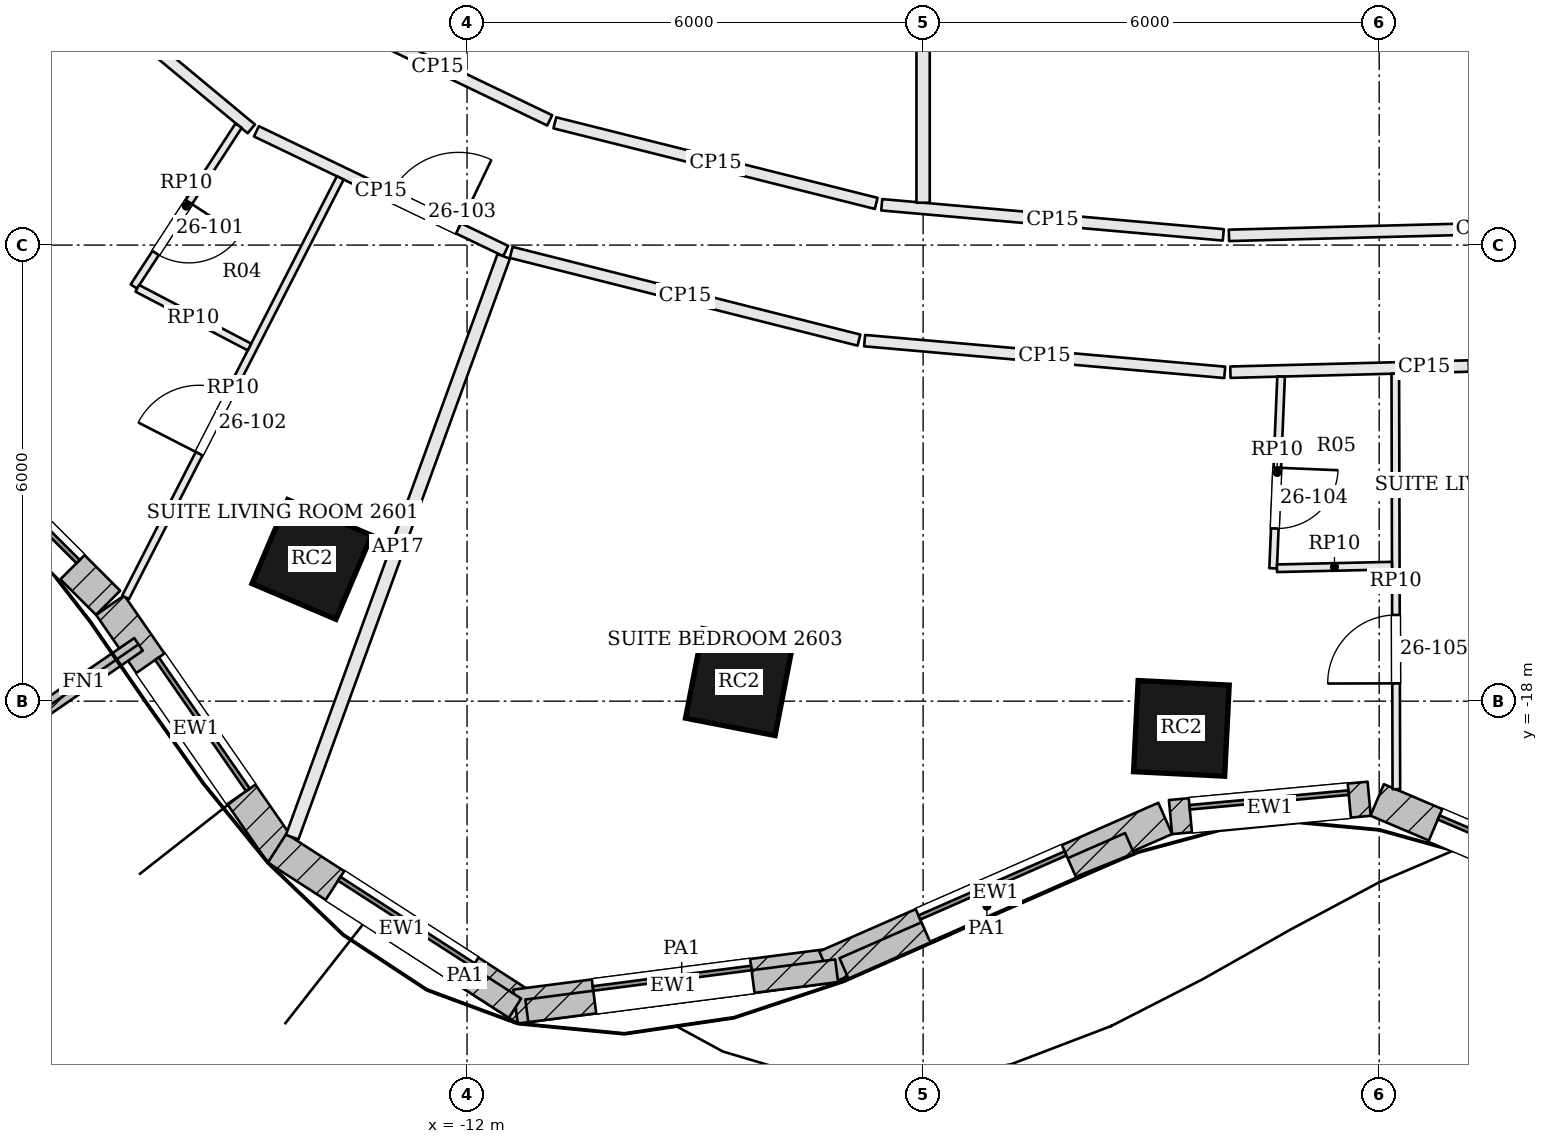
"""IFC4 building model, lengths in metres.
Left out: names, types, materials, properties, quantities, classifications, styles, units other than length and angle.
Written with IfcOpenShell. Run it as: python <this file> out.ifc"""

import sys

from ifc_helpers import new_model, si_unit, direction, frame, frame_2d, origin, origin_2d, place, context, subcontext, project, spatial, rectangle, extrude, element, fill, save


model = new_model("IFC4")
c1 = context("Model", 3, precision=1e-05, world=origin(), true_north=direction((0.0, 1.0)))
c2 = subcontext(c1, "Body", "Model", "MODEL_VIEW")
j1 = project(units=[si_unit("LENGTHUNIT", "METRE"), si_unit("PLANEANGLEUNIT", "RADIAN")], contexts=[c1])
p1 = place(None, origin())
s1 = spatial("IfcSite", under=j1, at=p1, CompositionType="ELEMENT")
p2 = place(p1, origin())
s2 = spatial("IfcBuilding", under=s1, at=p2, CompositionType="ELEMENT")
p3 = place(p2, frame((0.0, 0.0, 110.4)))
s3 = spatial("IfcBuildingStorey", under=s2, at=p3, CompositionType="ELEMENT", Elevation=110.4)
for number, where, z_axis, x_axis in (
    (1, (-14.042, -16.136, 0.0), (0.0, 0.0, 1.0), (0.92, -0.392, 0.0)),
    (2, (-8.422, -17.749, 0.0), (0.0, 0.0, 1.0), (0.982, -0.191, 0.0)),
    (3, (-2.602, -18.358, 0.0), (0.0, 0.0, 1.0), (0.999, -0.05, 0.0)),
):
    element("IfcColumn", number, at=place(p3, frame(where, z_axis=z_axis, x_axis=x_axis)), inside=s3, PredefinedType="COLUMN", context=c2, shape_type="SweptSolid", body=[
        extrude(rectangle(XDim=1.2, YDim=1.2, at=origin_2d()), origin(), (0.0, 0.0, 1.0), 3.6),
    ])
p4 = place(p3, frame((-19.145, -14.285, 0.0), z_axis=(0.0, 0.0, 1.0), x_axis=(0.707427521052, -0.706785895769, 0.0)))
e4 = element("IfcWall", 4, at=p4, inside=s3, PredefinedType="SOLIDWALL", context=c2, shape_type="SweptSolid", body=[
    extrude(rectangle(XDim=3.425, YDim=0.45, at=frame_2d((1.712, 0.0))), origin(), (0.0, 0.0, 1.0), 3.4),
])
p5 = place(p4, frame((0.662, 0.0, 0.9)))
e5 = element("IfcOpeningElement", 5, at=p5, cuts=e4, PredefinedType="OPENING", context=c2, shape_type="SweptSolid", body=[
    extrude(rectangle(XDim=2.1, YDim=2.0, at=frame_2d((1.05, 1.0))), frame((0.0, 0.235, 0.0), z_axis=(0.0, -1.0, 0.0), x_axis=(1.0, 0.0, 0.0)), (0.0, 0.0, 1.0), 0.47),
])
p6 = place(p3, frame((-16.695, -16.737, 0.0), z_axis=(0.0, 0.0, 1.0), x_axis=(0.569652445465, -0.821885692402, 0.0)))
e6 = element("IfcWall", 6, at=p6, inside=s3, PredefinedType="SOLIDWALL", context=c2, shape_type="SweptSolid", body=[
    extrude(rectangle(XDim=3.959, YDim=0.45, at=frame_2d((1.979, 0.0))), origin(), (0.0, 0.0, 1.0), 3.4),
])
p7 = place(p6, frame((0.929, 0.0, 0.9)))
e7 = element("IfcOpeningElement", 7, at=p7, cuts=e6, PredefinedType="OPENING", context=c2, shape_type="SweptSolid", body=[
    extrude(rectangle(XDim=2.1, YDim=2.0, at=frame_2d((1.05, 1.0))), frame((0.0, 0.235, 0.0), z_axis=(0.0, -1.0, 0.0), x_axis=(1.0, 0.0, 0.0)), (0.0, 0.0, 1.0), 0.47),
])
p8 = place(p3, frame((-14.499, -19.935, 0.0), z_axis=(0.0, 0.0, 1.0), x_axis=(0.84080910763, -0.541331732422, 0.0)))
e8 = element("IfcWall", 8, at=p8, inside=s3, PredefinedType="SOLIDWALL", context=c2, shape_type="SweptSolid", body=[
    extrude(rectangle(XDim=3.911, YDim=0.45, at=frame_2d((1.955, 0.0))), origin(), (0.0, 0.0, 1.0), 3.4),
])
p9 = place(p8, frame((0.905, 0.0, 0.9)))
e9 = element("IfcOpeningElement", 9, at=p9, cuts=e8, PredefinedType="OPENING", context=c2, shape_type="SweptSolid", body=[
    extrude(rectangle(XDim=2.1, YDim=2.0, at=frame_2d((1.05, 1.0))), frame((0.0, 0.235, 0.0), z_axis=(0.0, -1.0, 0.0), x_axis=(1.0, 0.0, 0.0)), (0.0, 0.0, 1.0), 0.47),
])
p10 = place(p3, frame((-11.362, -22.018, 0.0), z_axis=(0.0, 0.0, 1.0), x_axis=(0.991724958022, 0.128380713645, 0.0)))
e10 = element("IfcWall", 10, at=p10, inside=s3, PredefinedType="SOLIDWALL", context=c2, shape_type="SweptSolid", body=[
    extrude(rectangle(XDim=4.182, YDim=0.45, at=frame_2d((2.091, 0.0))), origin(), (0.0, 0.0, 1.0), 3.4),
])
p11 = place(p10, frame((1.041, 0.0, 0.9)))
e11 = element("IfcOpeningElement", 11, at=p11, cuts=e10, PredefinedType="OPENING", context=c2, shape_type="SweptSolid", body=[
    extrude(rectangle(XDim=2.1, YDim=2.0, at=frame_2d((1.05, 1.0))), frame((0.0, 0.235, 0.0), z_axis=(0.0, -1.0, 0.0), x_axis=(1.0, 0.0, 0.0)), (0.0, 0.0, 1.0), 0.47),
])
p12 = place(p3, frame((-7.276, -21.498, 0.0), z_axis=(0.0, 0.0, 1.0), x_axis=(0.915872941312, 0.401468249519, 0.0)))
e12 = element("IfcWall", 12, at=p12, inside=s3, PredefinedType="SOLIDWALL", context=c2, shape_type="SweptSolid", body=[
    extrude(rectangle(XDim=4.87, YDim=0.45, at=frame_2d((2.435, 0.0))), origin(), (0.0, 0.0, 1.0), 3.4),
])
p13 = place(p12, frame((1.385, 0.0, 0.9)))
e13 = element("IfcOpeningElement", 13, at=p13, cuts=e12, PredefinedType="OPENING", context=c2, shape_type="SweptSolid", body=[
    extrude(rectangle(XDim=2.1, YDim=2.0, at=frame_2d((1.05, 1.0))), frame((0.0, 0.235, 0.0), z_axis=(0.0, -1.0, 0.0), x_axis=(1.0, 0.0, 0.0)), (0.0, 0.0, 1.0), 0.47),
])
p14 = place(p3, frame((-2.745, -19.525, 0.0), z_axis=(0.0, 0.0, 1.0), x_axis=(0.995768774275, 0.091894222771, 0.0)))
e14 = element("IfcWall", 14, at=p14, inside=s3, PredefinedType="SOLIDWALL", context=c2, shape_type="SweptSolid", body=[
    extrude(rectangle(XDim=2.625, YDim=0.45, at=frame_2d((1.312, 0.0))), origin(), (0.0, 0.0, 1.0), 3.4),
])
p15 = place(p14, frame((0.262, 0.0, 0.9)))
e15 = element("IfcOpeningElement", 15, at=p15, cuts=e14, PredefinedType="OPENING", context=c2, shape_type="SweptSolid", body=[
    extrude(rectangle(XDim=2.1, YDim=2.0, at=frame_2d((1.05, 1.0))), frame((0.0, 0.235, 0.0), z_axis=(0.0, -1.0, 0.0), x_axis=(1.0, 0.0, 0.0)), (0.0, 0.0, 1.0), 0.47),
])
p16 = place(p3, frame((-0.026, -19.299, 0.0), z_axis=(0.0, 0.0, 1.0), x_axis=(0.920040408927, -0.391823488245, 0.0)))
e16 = element("IfcWall", 16, at=p16, inside=s3, PredefinedType="SOLIDWALL", context=c2, shape_type="SweptSolid", body=[
    extrude(rectangle(XDim=3.77, YDim=0.45, at=frame_2d((1.885, 0.0))), origin(), (0.0, 0.0, 1.0), 3.4),
])
p17 = place(p16, frame((0.835, 0.0, 0.9)))
e17 = element("IfcOpeningElement", 17, at=p17, cuts=e16, PredefinedType="OPENING", context=c2, shape_type="SweptSolid", body=[
    extrude(rectangle(XDim=2.1, YDim=2.0, at=frame_2d((1.05, 1.0))), frame((0.0, 0.235, 0.0), z_axis=(0.0, -1.0, 0.0), x_axis=(1.0, 0.0, 0.0)), (0.0, 0.0, 1.0), 0.47),
])
p18 = place(p3, frame((-16.322, -17.253, 0.0), z_axis=(0.0, 0.0, 1.0), x_axis=(-0.824440606412, -0.565948483962, 0.0)))
e18 = element("IfcWall", 18, at=p18, inside=s3, PredefinedType="SOLIDWALL", context=c2, shape_type="SweptSolid", body=[
    extrude(rectangle(XDim=1.75, YDim=0.2, at=frame_2d((0.875, 0.0))), origin(), (0.0, 0.0, 1.0), 3.4),
])
p19 = place(p3, frame((-12.68, -21.195, 3.6), z_axis=(0.0, 0.0, 1.0), x_axis=(0.840806975541, -0.541335044018, 0.0)))
e19 = element("IfcWall", 19, at=p19, inside=s3, PredefinedType="PARAPET", context=c2, shape_type="SweptSolid", body=[
    extrude(rectangle(XDim=1.56, YDim=0.3, at=frame_2d((0.78, 0.0))), origin(), (0.0, 0.0, 1.0), 1.1),
])
p20 = place(p3, frame((-11.214, -22.074, 3.6), z_axis=(0.0, 0.0, 1.0), x_axis=(0.991727449614, 0.128361464939, 0.0)))
e20 = element("IfcWall", 20, at=p20, inside=s3, PredefinedType="PARAPET", context=c2, shape_type="SweptSolid", body=[
    extrude(rectangle(XDim=4.11, YDim=0.3, at=frame_2d((2.055, 0.0))), origin(), (0.0, 0.0, 1.0), 1.1),
])
p21 = place(p3, frame((-7.039, -21.519, 3.6), z_axis=(0.0, 0.0, 1.0), x_axis=(0.915890739732, 0.401427643384, 0.0)))
e21 = element("IfcWall", 21, at=p21, inside=s3, PredefinedType="PARAPET", context=c2, shape_type="SweptSolid", body=[
    extrude(rectangle(XDim=4.102, YDim=0.3, at=frame_2d((2.051, 0.0))), origin(), (0.0, 0.0, 1.0), 1.1),
])
p22 = place(p3, frame((-17.446, -8.304, 0.0), z_axis=(0.0, 0.0, 1.0), x_axis=(0.769200174495, -0.639007896318, 0.0)))
e22 = element("IfcWall", 22, at=p22, inside=s3, PredefinedType="PARTITIONING", context=c2, shape_type="SweptSolid", body=[
    extrude(rectangle(XDim=3.39, YDim=0.15, at=frame_2d((1.695, 0.0))), origin(), (0.0, 0.0, 1.0), 2.784),
])
p23 = place(p3, frame((-14.771, -10.503, 0.0), z_axis=(0.0, 0.0, 1.0), x_axis=(0.901506299534, -0.432765978216, 0.0)))
e23 = element("IfcWall", 23, at=p23, inside=s3, PredefinedType="PARTITIONING", context=c2, shape_type="SweptSolid", body=[
    extrude(rectangle(XDim=3.638, YDim=0.15, at=frame_2d((1.819, 0.0))), origin(), (0.0, 0.0, 1.0), 2.784),
])
p24 = place(p23, frame((1.949, 0.0, 0.0)))
e24 = element("IfcOpeningElement", 24, at=p24, cuts=e23, PredefinedType="OPENING", context=c2, shape_type="SweptSolid", body=[
    extrude(rectangle(XDim=1.0, YDim=2.1, at=frame_2d((0.5, 1.05))), frame((0.0, 0.085, 0.0), z_axis=(0.0, -1.0, 0.0), x_axis=(1.0, 0.0, 0.0)), (0.0, 0.0, 1.0), 0.17),
])
p25 = place(p3, frame((-14.301, -19.789, 0.0), z_axis=(0.0, 0.0, 1.0), x_axis=(0.342254048829, 0.939607453174, 0.0)))
e25 = element("IfcWall", 25, at=p25, inside=s3, PredefinedType="PARTITIONING", context=c2, shape_type="SweptSolid", body=[
    extrude(rectangle(XDim=8.132, YDim=0.175, at=frame_2d((4.066, 0.0))), origin(), (0.0, 0.0, 1.0), 2.784),
])
p26 = place(p3, frame((-11.419, -12.096, 0.0), z_axis=(0.0, 0.0, 1.0), x_axis=(0.969625924548, -0.244592654109, 0.0)))
e26 = element("IfcWall", 26, at=p26, inside=s3, PredefinedType="PARTITIONING", context=c2, shape_type="SweptSolid", body=[
    extrude(rectangle(XDim=4.718, YDim=0.15, at=frame_2d((2.359, 0.0))), origin(), (0.0, 0.0, 1.0), 2.784),
])
p27 = place(p3, frame((-6.77, -13.257, 0.0), z_axis=(0.0, 0.0, 1.0), x_axis=(0.996139758015, -0.08778144737, 0.0)))
e27 = element("IfcWall", 27, at=p27, inside=s3, PredefinedType="PARTITIONING", context=c2, shape_type="SweptSolid", body=[
    extrude(rectangle(XDim=4.756, YDim=0.15, at=frame_2d((2.378, 0.0))), origin(), (0.0, 0.0, 1.0), 2.784),
])
p28 = place(p3, frame((-1.957, -13.672, 0.0), z_axis=(0.0, 0.0, 1.0), x_axis=(0.999663973177, 0.025921819609, 0.0)))
e28 = element("IfcWall", 28, at=p28, inside=s3, PredefinedType="PARTITIONING", context=c2, shape_type="SweptSolid", body=[
    extrude(rectangle(XDim=5.105, YDim=0.15, at=frame_2d((2.552, 0.0))), origin(), (0.0, 0.0, 1.0), 2.784),
])
p29 = place(p28, frame((3.137, 0.0, 0.0)))
e29 = element("IfcOpeningElement", 29, at=p29, cuts=e28, PredefinedType="OPENING", context=c2, shape_type="SweptSolid", body=[
    extrude(rectangle(XDim=1.0, YDim=2.1, at=frame_2d((0.5, 1.05))), frame((0.0, 0.085, 0.0), z_axis=(0.0, -1.0, 0.0), x_axis=(1.0, 0.0, 0.0)), (0.0, 0.0, 1.0), 0.17),
])
p30 = place(p3, frame((4.684, -11.699, 0.0), z_axis=(0.0, 0.0, 1.0), x_axis=(-0.999663438204, -0.025942442425, 0.0)))
e30 = element("IfcWall", 30, at=p30, inside=s3, PredefinedType="PARTITIONING", context=c2, shape_type="SweptSolid", body=[
    extrude(rectangle(XDim=6.663, YDim=0.15, at=frame_2d((3.332, 0.0))), origin(), (0.0, 0.0, 1.0), 2.784),
])
p31 = place(p3, frame((-2.051, -11.865, 0.0), z_axis=(0.0, 0.0, 1.0), x_axis=(-0.996139599493, 0.087783246245, 0.0)))
e31 = element("IfcWall", 31, at=p31, inside=s3, PredefinedType="PARTITIONING", context=c2, shape_type="SweptSolid", body=[
    extrude(rectangle(XDim=4.511, YDim=0.15, at=frame_2d((2.255, 0.0))), origin(), (0.0, 0.0, 1.0), 2.784),
])
p32 = place(p3, frame((-6.617, -11.451, 0.0), z_axis=(0.0, 0.0, 1.0), x_axis=(-0.969987441267, 0.243155020069, 0.0)))
e32 = element("IfcWall", 32, at=p32, inside=s3, PredefinedType="PARTITIONING", context=c2, shape_type="SweptSolid", body=[
    extrude(rectangle(XDim=4.359, YDim=0.15, at=frame_2d((2.179, 0.0))), origin(), (0.0, 0.0, 1.0), 2.784),
])
p33 = place(p3, frame((-10.913, -10.359, 0.0), z_axis=(0.0, 0.0, 1.0), x_axis=(-0.90149741277, 0.432784489982, 0.0)))
e33 = element("IfcWall", 33, at=p33, inside=s3, PredefinedType="PARTITIONING", context=c2, shape_type="SweptSolid", body=[
    extrude(rectangle(XDim=3.269, YDim=0.15, at=frame_2d((1.634, 0.0))), origin(), (0.0, 0.0, 1.0), 2.784),
])
p34 = place(p3, frame((-16.492, -16.635, 0.0), z_axis=(0.0, 0.0, 1.0), x_axis=(0.455543309506, 0.890213622208, 0.0)))
e34 = element("IfcWall", 34, at=p34, inside=s3, PredefinedType="PARTITIONING", context=c2, shape_type="SweptSolid", body=[
    extrude(rectangle(XDim=6.199, YDim=0.1, at=frame_2d((3.1, 0.0))), origin(), (0.0, 0.0, 1.0), 2.884),
])
p35 = place(p34, frame((2.124, 0.0, 0.0)))
e35 = element("IfcOpeningElement", 35, at=p35, cuts=e34, PredefinedType="OPENING", context=c2, shape_type="SweptSolid", body=[
    extrude(rectangle(XDim=0.9, YDim=2.4, at=frame_2d((0.45, 1.2))), frame((0.0, 0.06, 0.0), z_axis=(0.0, -1.0, 0.0), x_axis=(1.0, 0.0, 0.0)), (0.0, 0.0, 1.0), 0.12),
])
p36 = place(p3, frame((-15.006, -10.429, 0.0), z_axis=(0.0, 0.0, 1.0), x_axis=(-0.545698435258, -0.837981633306, 0.0)))
e36 = element("IfcWall", 36, at=p36, inside=s3, PredefinedType="PARTITIONING", context=c2, shape_type="SweptSolid", body=[
    extrude(rectangle(XDim=2.525, YDim=0.1, at=frame_2d((1.263, 0.0))), origin(), (0.0, 0.0, 1.0), 2.884),
])
p37 = place(p36, frame((1.2, 0.0, 0.0)))
e37 = element("IfcOpeningElement", 37, at=p37, cuts=e36, PredefinedType="OPENING", context=c2, shape_type="SweptSolid", body=[
    extrude(rectangle(XDim=0.8, YDim=2.1, at=frame_2d((0.4, 1.05))), frame((0.0, 0.06, 0.0), z_axis=(0.0, -1.0, 0.0), x_axis=(1.0, 0.0, 0.0)), (0.0, 0.0, 1.0), 0.12),
])
p38 = place(p3, frame((-16.339, -12.568, 0.0), z_axis=(0.0, 0.0, 1.0), x_axis=(0.885980612304, -0.463722281783, 0.0)))
e38 = element("IfcWall", 38, at=p38, inside=s3, PredefinedType="PARTITIONING", context=c2, shape_type="SweptSolid", body=[
    extrude(rectangle(XDim=1.666, YDim=0.1, at=frame_2d((0.833, 0.0))), origin(), (0.0, 0.0, 1.0), 2.884),
])
p39 = place(p3, frame((0.226, -19.158, 0.0), z_axis=(0.0, 0.0, 1.0), x_axis=(-0.002545543736, 0.999996760098, 0.0)))
e39 = element("IfcWall", 39, at=p39, inside=s3, PredefinedType="PARTITIONING", context=c2, shape_type="SweptSolid", body=[
    extrude(rectangle(XDim=5.467, YDim=0.1, at=frame_2d((2.733, 0.0))), origin(), (0.0, 0.0, 1.0), 2.884),
])
p40 = place(p39, frame((1.392, 0.0, 0.0)))
e40 = element("IfcOpeningElement", 40, at=p40, cuts=e39, PredefinedType="OPENING", context=c2, shape_type="SweptSolid", body=[
    extrude(rectangle(XDim=0.9, YDim=2.4, at=frame_2d((0.45, 1.2))), frame((0.0, 0.06, 0.0), z_axis=(0.0, -1.0, 0.0), x_axis=(1.0, 0.0, 0.0)), (0.0, 0.0, 1.0), 0.12),
])
p41 = place(p3, frame((-1.291, -13.73, 0.0), z_axis=(0.0, 0.0, 1.0), x_axis=(-0.041381206549, -0.999143431017, 0.0)))
e41 = element("IfcWall", 41, at=p41, inside=s3, PredefinedType="PARTITIONING", context=c2, shape_type="SweptSolid", body=[
    extrude(rectangle(XDim=2.525, YDim=0.1, at=frame_2d((1.263, 0.0))), origin(), (0.0, 0.0, 1.0), 2.884),
])
p42 = place(p41, frame((1.2, 0.0, 0.0)))
e42 = element("IfcOpeningElement", 42, at=p42, cuts=e41, PredefinedType="OPENING", context=c2, shape_type="SweptSolid", body=[
    extrude(rectangle(XDim=0.8, YDim=2.1, at=frame_2d((0.4, 1.05))), frame((0.0, 0.06, 0.0), z_axis=(0.0, -1.0, 0.0), x_axis=(1.0, 0.0, 0.0)), (0.0, 0.0, 1.0), 0.12),
])
p43 = place(p3, frame((-1.345, -16.251, 0.0), z_axis=(0.0, 0.0, 1.0), x_axis=(0.999741502451, 0.022736056749, 0.0)))
e43 = element("IfcWall", 43, at=p43, inside=s3, PredefinedType="PARTITIONING", context=c2, shape_type="SweptSolid", body=[
    extrude(rectangle(XDim=1.514, YDim=0.1, at=frame_2d((0.757, 0.0))), origin(), (0.0, 0.0, 1.0), 2.884),
])
p44 = place(p3, frame((-6.0, -11.442, 0.0), z_axis=(0.0, 0.0, 1.0), x_axis=(0.0, 1.0, 0.0)))
e44 = element("IfcWall", 44, at=p44, inside=s3, PredefinedType="PARTITIONING", context=c2, shape_type="SweptSolid", body=[
    extrude(rectangle(XDim=6.567, YDim=0.175, at=frame_2d((3.284, 0.0))), origin(), (0.0, 0.0, 1.0), 2.784),
])
p45 = place(p5, origin())
e45 = element("IfcWindow", 45, at=p45, inside=s3, PartitioningType="SINGLE_PANEL", PredefinedType="WINDOW", context=c2, shape_type="SweptSolid", body=[
    extrude(rectangle(XDim=2.1, YDim=2.0, at=frame_2d((1.05, 1.0))), frame((0.0, 0.135, 0.0), z_axis=(0.0, -1.0, 0.0), x_axis=(1.0, 0.0, 0.0)), (0.0, 0.0, 1.0), 0.06),
])
fill(e5, e45)
p46 = place(p7, origin())
e46 = element("IfcWindow", 46, at=p46, inside=s3, PartitioningType="SINGLE_PANEL", PredefinedType="WINDOW", context=c2, shape_type="SweptSolid", body=[
    extrude(rectangle(XDim=2.1, YDim=2.0, at=frame_2d((1.05, 1.0))), frame((0.0, 0.135, 0.0), z_axis=(0.0, -1.0, 0.0), x_axis=(1.0, 0.0, 0.0)), (0.0, 0.0, 1.0), 0.06),
])
fill(e7, e46)
p47 = place(p9, origin())
e47 = element("IfcWindow", 47, at=p47, inside=s3, PartitioningType="SINGLE_PANEL", PredefinedType="WINDOW", context=c2, shape_type="SweptSolid", body=[
    extrude(rectangle(XDim=2.1, YDim=2.0, at=frame_2d((1.05, 1.0))), frame((0.0, 0.135, 0.0), z_axis=(0.0, -1.0, 0.0), x_axis=(1.0, 0.0, 0.0)), (0.0, 0.0, 1.0), 0.06),
])
fill(e9, e47)
p48 = place(p11, origin())
e48 = element("IfcWindow", 48, at=p48, inside=s3, PartitioningType="SINGLE_PANEL", PredefinedType="WINDOW", context=c2, shape_type="SweptSolid", body=[
    extrude(rectangle(XDim=2.1, YDim=2.0, at=frame_2d((1.05, 1.0))), frame((0.0, 0.135, 0.0), z_axis=(0.0, -1.0, 0.0), x_axis=(1.0, 0.0, 0.0)), (0.0, 0.0, 1.0), 0.06),
])
fill(e11, e48)
p49 = place(p13, origin())
e49 = element("IfcWindow", 49, at=p49, inside=s3, PartitioningType="SINGLE_PANEL", PredefinedType="WINDOW", context=c2, shape_type="SweptSolid", body=[
    extrude(rectangle(XDim=2.1, YDim=2.0, at=frame_2d((1.05, 1.0))), frame((0.0, 0.135, 0.0), z_axis=(0.0, -1.0, 0.0), x_axis=(1.0, 0.0, 0.0)), (0.0, 0.0, 1.0), 0.06),
])
fill(e13, e49)
p50 = place(p15, origin())
e50 = element("IfcWindow", 50, at=p50, inside=s3, PartitioningType="SINGLE_PANEL", PredefinedType="WINDOW", context=c2, shape_type="SweptSolid", body=[
    extrude(rectangle(XDim=2.1, YDim=2.0, at=frame_2d((1.05, 1.0))), frame((0.0, 0.135, 0.0), z_axis=(0.0, -1.0, 0.0), x_axis=(1.0, 0.0, 0.0)), (0.0, 0.0, 1.0), 0.06),
])
fill(e15, e50)
p51 = place(p17, origin())
e51 = element("IfcWindow", 51, at=p51, inside=s3, PartitioningType="SINGLE_PANEL", PredefinedType="WINDOW", context=c2, shape_type="SweptSolid", body=[
    extrude(rectangle(XDim=2.1, YDim=2.0, at=frame_2d((1.05, 1.0))), frame((0.0, 0.135, 0.0), z_axis=(0.0, -1.0, 0.0), x_axis=(1.0, 0.0, 0.0)), (0.0, 0.0, 1.0), 0.06),
])
fill(e17, e51)
p52 = place(p37, origin())
e52 = element("IfcDoor", 52, at=p52, inside=s3, OperationType="SINGLE_SWING_LEFT", PredefinedType="DOOR", context=c2, shape_type="SweptSolid", body=[
    extrude(rectangle(XDim=0.8, YDim=2.1, at=frame_2d((0.4, 1.05))), frame((0.0, 0.025, 0.0), z_axis=(0.0, -1.0, 0.0), x_axis=(1.0, 0.0, 0.0)), (0.0, 0.0, 1.0), 0.05),
])
fill(e37, e52)
p53 = place(p35, origin())
e53 = element("IfcDoor", 53, at=p53, inside=s3, OperationType="SINGLE_SWING_LEFT", PredefinedType="DOOR", context=c2, shape_type="SweptSolid", body=[
    extrude(rectangle(XDim=0.9, YDim=2.4, at=frame_2d((0.45, 1.2))), frame((0.0, 0.025, 0.0), z_axis=(0.0, -1.0, 0.0), x_axis=(1.0, 0.0, 0.0)), (0.0, 0.0, 1.0), 0.05),
])
fill(e35, e53)
p54 = place(p24, origin())
e54 = element("IfcDoor", 54, at=p54, inside=s3, OperationType="SINGLE_SWING_RIGHT", PredefinedType="DOOR", context=c2, shape_type="SweptSolid", body=[
    extrude(rectangle(XDim=1.0, YDim=2.1, at=frame_2d((0.5, 1.05))), frame((0.0, 0.025, 0.0), z_axis=(0.0, -1.0, 0.0), x_axis=(1.0, 0.0, 0.0)), (0.0, 0.0, 1.0), 0.05),
])
fill(e24, e54)
p55 = place(p42, origin())
e55 = element("IfcDoor", 55, at=p55, inside=s3, OperationType="SINGLE_SWING_LEFT", PredefinedType="DOOR", context=c2, shape_type="SweptSolid", body=[
    extrude(rectangle(XDim=0.8, YDim=2.1, at=frame_2d((0.4, 1.05))), frame((0.0, 0.025, 0.0), z_axis=(0.0, -1.0, 0.0), x_axis=(1.0, 0.0, 0.0)), (0.0, 0.0, 1.0), 0.05),
])
fill(e42, e55)
p56 = place(p40, origin())
e56 = element("IfcDoor", 56, at=p56, inside=s3, OperationType="SINGLE_SWING_LEFT", PredefinedType="DOOR", context=c2, shape_type="SweptSolid", body=[
    extrude(rectangle(XDim=0.9, YDim=2.4, at=frame_2d((0.45, 1.2))), frame((0.0, 0.025, 0.0), z_axis=(0.0, -1.0, 0.0), x_axis=(1.0, 0.0, 0.0)), (0.0, 0.0, 1.0), 0.05),
])
fill(e40, e56)
save(model, sys.argv[1])
